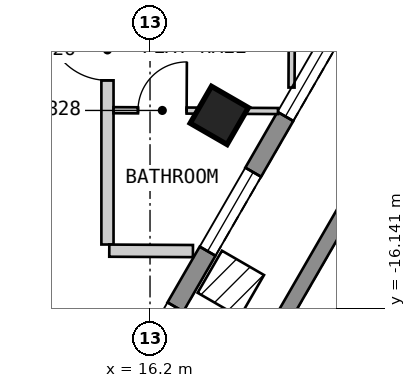
"""IFC4 building model, lengths in metres.
Left out: names, types, materials, properties, quantities, classifications, styles, units other than length and angle.
Written with IfcOpenShell. Run it as: python <this file> out.ifc"""

import sys

from ifc_helpers import new_model, si_unit, direction, frame, frame_2d, origin, origin_2d, place, context, subcontext, project, spatial, polyline, rectangle, outline, extrude, element, fill, save


model = new_model("IFC4")
c1 = context("Model", 3, precision=1e-05, world=origin(), true_north=direction((0.0, 1.0)))
c2 = subcontext(c1, "Body", "Model", "MODEL_VIEW")
j1 = project(units=[si_unit("LENGTHUNIT", "METRE"), si_unit("PLANEANGLEUNIT", "RADIAN")], contexts=[c1])
p1 = place(None, origin())
s1 = spatial("IfcSite", under=j1, at=p1, CompositionType="ELEMENT")
p2 = place(p1, origin())
s2 = spatial("IfcBuilding", under=s1, at=p2, CompositionType="ELEMENT")
p3 = place(p2, frame((0.0, 0.0, 202.8)))
s3 = spatial("IfcBuildingStorey", under=s2, at=p3, CompositionType="ELEMENT", Elevation=202.8)
p4 = place(p3, frame((17.339, -12.967, 0.0), z_axis=(0.0, 0.0, 1.0), x_axis=(0.499984884929, 0.866034130299, 0.0)))
e1 = element("IfcColumn", 1, at=p4, inside=s3, PredefinedType="COLUMN", context=c2, shape_type="SweptSolid", body=[
    extrude(rectangle(XDim=0.7, YDim=0.7, at=origin_2d()), origin(), (0.0, 0.0, 1.0), 3.0),
])
p5 = place(p3, frame((15.285, -18.425, 0.0), z_axis=(0.0, 0.0, 1.0), x_axis=(0.500012653391, 0.866018098222, 0.0)))
e2 = element("IfcWall", 2, at=p5, inside=s3, PredefinedType="SOLIDWALL", context=c2, shape_type="SweptSolid", body=[
    extrude(outline(polyline([(0.0, -0.15), (16.628, -0.15), (16.548, 0.15), (0.08, 0.15), (0.0, -0.15)])), origin(), (0.0, 0.0, 1.0), 2.7),
])
p6 = place(p5, frame((1.165, 0.0, 0.15)))
e3 = element("IfcOpeningElement", 3, at=p6, cuts=e2, PredefinedType="OPENING", context=c2, shape_type="SweptSolid", body=[
    extrude(rectangle(XDim=1.5, YDim=2.1, at=frame_2d((0.75, 1.05))), frame((0.0, 0.16, 0.0), z_axis=(0.0, -1.0, 0.0), x_axis=(1.0, 0.0, 0.0)), (0.0, 0.0, 1.0), 0.32),
])
p7 = place(p5, frame((3.724, 0.0, 0.15)))
e4 = element("IfcOpeningElement", 4, at=p7, cuts=e2, PredefinedType="OPENING", context=c2, shape_type="SweptSolid", body=[
    extrude(rectangle(XDim=1.5, YDim=2.1, at=frame_2d((0.75, 1.05))), frame((0.0, 0.16, 0.0), z_axis=(0.0, -1.0, 0.0), x_axis=(1.0, 0.0, 0.0)), (0.0, 0.0, 1.0), 0.32),
])
p8 = place(p5, frame((6.283, 0.0, 0.15)))
e5 = element("IfcOpeningElement", 5, at=p8, cuts=e2, PredefinedType="OPENING", context=c2, shape_type="SweptSolid", body=[
    extrude(rectangle(XDim=1.5, YDim=2.1, at=frame_2d((0.75, 1.05))), frame((0.0, 0.16, 0.0), z_axis=(0.0, -1.0, 0.0), x_axis=(1.0, 0.0, 0.0)), (0.0, 0.0, 1.0), 0.32),
])
p9 = place(p5, frame((8.843, 0.0, 0.15)))
e6 = element("IfcOpeningElement", 6, at=p9, cuts=e2, PredefinedType="OPENING", context=c2, shape_type="SweptSolid", body=[
    extrude(rectangle(XDim=1.5, YDim=2.1, at=frame_2d((0.75, 1.05))), frame((0.0, 0.16, 0.0), z_axis=(0.0, -1.0, 0.0), x_axis=(1.0, 0.0, 0.0)), (0.0, 0.0, 1.0), 0.32),
])
p10 = place(p5, frame((11.402, 0.0, 0.15)))
e7 = element("IfcOpeningElement", 7, at=p10, cuts=e2, PredefinedType="OPENING", context=c2, shape_type="SweptSolid", body=[
    extrude(rectangle(XDim=1.5, YDim=2.1, at=frame_2d((0.75, 1.05))), frame((0.0, 0.16, 0.0), z_axis=(0.0, -1.0, 0.0), x_axis=(1.0, 0.0, 0.0)), (0.0, 0.0, 1.0), 0.32),
])
p11 = place(p5, frame((13.962, 0.0, 0.15)))
e8 = element("IfcOpeningElement", 8, at=p11, cuts=e2, PredefinedType="OPENING", context=c2, shape_type="SweptSolid", body=[
    extrude(rectangle(XDim=1.5, YDim=2.1, at=frame_2d((0.75, 1.05))), frame((0.0, 0.16, 0.0), z_axis=(0.0, -1.0, 0.0), x_axis=(1.0, 0.0, 0.0)), (0.0, 0.0, 1.0), 0.32),
])
p12 = place(p3, frame((26.046, -3.038, 0.0), z_axis=(0.0, 0.0, 1.0), x_axis=(-0.500074253024, -0.865982529536, 0.0)))
e9 = element("IfcWall", 9, at=p12, inside=s3, PredefinedType="PARAPET", context=c2, shape_type="SweptSolid", body=[
    extrude(outline(polyline([(0.067, -0.125), (20.718, -0.125), (20.784, 0.125), (0.0, 0.125), (0.067, -0.125)])), origin(), (0.0, 0.0, 1.0), 1.6),
])
p13 = place(p3, frame((15.5, -15.09, 0.0), z_axis=(0.0, 0.0, 1.0), x_axis=(0.0, 1.0, 0.0)))
e10 = element("IfcWall", 10, at=p13, inside=s3, PredefinedType="PARTITIONING", context=c2, shape_type="SweptSolid", body=[
    extrude(rectangle(XDim=4.14, YDim=0.2, at=frame_2d((2.07, 0.0))), origin(), (0.0, 0.0, 1.0), 2.7),
])
p14 = place(p13, frame((2.7, 0.0, 0.0)))
e11 = element("IfcOpeningElement", 11, at=p14, cuts=e10, PredefinedType="OPENING", context=c2, shape_type="SweptSolid", body=[
    extrude(rectangle(XDim=1.0, YDim=2.1, at=frame_2d((0.5, 1.05))), frame((0.0, 0.11, 0.0), z_axis=(0.0, -1.0, 0.0), x_axis=(1.0, 0.0, 0.0)), (0.0, 0.0, 1.0), 0.22),
])
p15 = place(p3, frame((15.6, -12.881, 0.0), z_axis=(0.0, 0.0, 1.0), x_axis=(0.999986765426, -0.00514480058, 0.0)))
e12 = element("IfcWall", 12, at=p15, inside=s3, PredefinedType="PARTITIONING", context=c2, shape_type="SweptSolid", body=[
    extrude(rectangle(XDim=2.705, YDim=0.1, at=frame_2d((1.353, 0.0))), origin(), (0.0, 0.0, 1.0), 2.7),
])
p16 = place(p15, frame((0.402, 0.0, 0.0)))
e13 = element("IfcOpeningElement", 13, at=p16, cuts=e12, PredefinedType="OPENING", context=c2, shape_type="SweptSolid", body=[
    extrude(rectangle(XDim=0.8, YDim=2.1, at=frame_2d((0.4, 1.05))), frame((0.0, 0.06, 0.0), z_axis=(0.0, -1.0, 0.0), x_axis=(1.0, 0.0, 0.0)), (0.0, 0.0, 1.0), 0.12),
])
p17 = place(p3, frame((18.527, -12.509, 0.0), z_axis=(0.0, 0.0, 1.0), x_axis=(0.004907163735, 0.9999879598, 0.0)))
e14 = element("IfcWall", 14, at=p17, inside=s3, PredefinedType="PARTITIONING", context=c2, shape_type="SweptSolid", body=[
    extrude(rectangle(XDim=1.592, YDim=0.1, at=frame_2d((0.796, 0.0))), origin(), (0.0, 0.0, 1.0), 2.7),
])
p18 = place(p3, frame((15.53, -15.191, 0.0), z_axis=(0.0, 0.0, 1.0), x_axis=(0.999986762212, -0.005145425143, 0.0)))
e15 = element("IfcWall", 15, at=p18, inside=s3, PredefinedType="PARTITIONING", context=c2, shape_type="SweptSolid", body=[
    extrude(rectangle(XDim=1.376, YDim=0.2, at=frame_2d((0.688, 0.0))), origin(), (0.0, 0.0, 1.0), 2.7),
])
p19 = place(p6, origin())
e16 = element("IfcWindow", 16, at=p19, inside=s3, PartitioningType="SINGLE_PANEL", PredefinedType="WINDOW", context=c2, shape_type="SweptSolid", body=[
    extrude(rectangle(XDim=1.5, YDim=2.1, at=frame_2d((0.75, 1.05))), frame((0.0, 0.03, 0.0), z_axis=(0.0, -1.0, 0.0), x_axis=(1.0, 0.0, 0.0)), (0.0, 0.0, 1.0), 0.06),
])
fill(e3, e16)
p20 = place(p7, origin())
e17 = element("IfcWindow", 17, at=p20, inside=s3, PartitioningType="SINGLE_PANEL", PredefinedType="WINDOW", context=c2, shape_type="SweptSolid", body=[
    extrude(rectangle(XDim=1.5, YDim=2.1, at=frame_2d((0.75, 1.05))), frame((0.0, 0.03, 0.0), z_axis=(0.0, -1.0, 0.0), x_axis=(1.0, 0.0, 0.0)), (0.0, 0.0, 1.0), 0.06),
])
fill(e4, e17)
p21 = place(p8, origin())
e18 = element("IfcWindow", 18, at=p21, inside=s3, PartitioningType="SINGLE_PANEL", PredefinedType="WINDOW", context=c2, shape_type="SweptSolid", body=[
    extrude(rectangle(XDim=1.5, YDim=2.1, at=frame_2d((0.75, 1.05))), frame((0.0, 0.03, 0.0), z_axis=(0.0, -1.0, 0.0), x_axis=(1.0, 0.0, 0.0)), (0.0, 0.0, 1.0), 0.06),
])
fill(e5, e18)
p22 = place(p14, origin())
e19 = element("IfcDoor", 19, at=p22, inside=s3, OperationType="SINGLE_SWING_RIGHT", PredefinedType="DOOR", context=c2, shape_type="SweptSolid", body=[
    extrude(rectangle(XDim=1.0, YDim=2.1, at=frame_2d((0.5, 1.05))), frame((0.0, 0.025, 0.0), z_axis=(0.0, -1.0, 0.0), x_axis=(1.0, 0.0, 0.0)), (0.0, 0.0, 1.0), 0.05),
])
fill(e11, e19)
p23 = place(p16, origin())
e20 = element("IfcDoor", 20, at=p23, inside=s3, OperationType="SINGLE_SWING_RIGHT", PredefinedType="DOOR", context=c2, shape_type="SweptSolid", body=[
    extrude(rectangle(XDim=0.8, YDim=2.1, at=frame_2d((0.4, 1.05))), frame((0.0, 0.025, 0.0), z_axis=(0.0, -1.0, 0.0), x_axis=(1.0, 0.0, 0.0)), (0.0, 0.0, 1.0), 0.05),
])
fill(e13, e20)
save(model, sys.argv[1])
